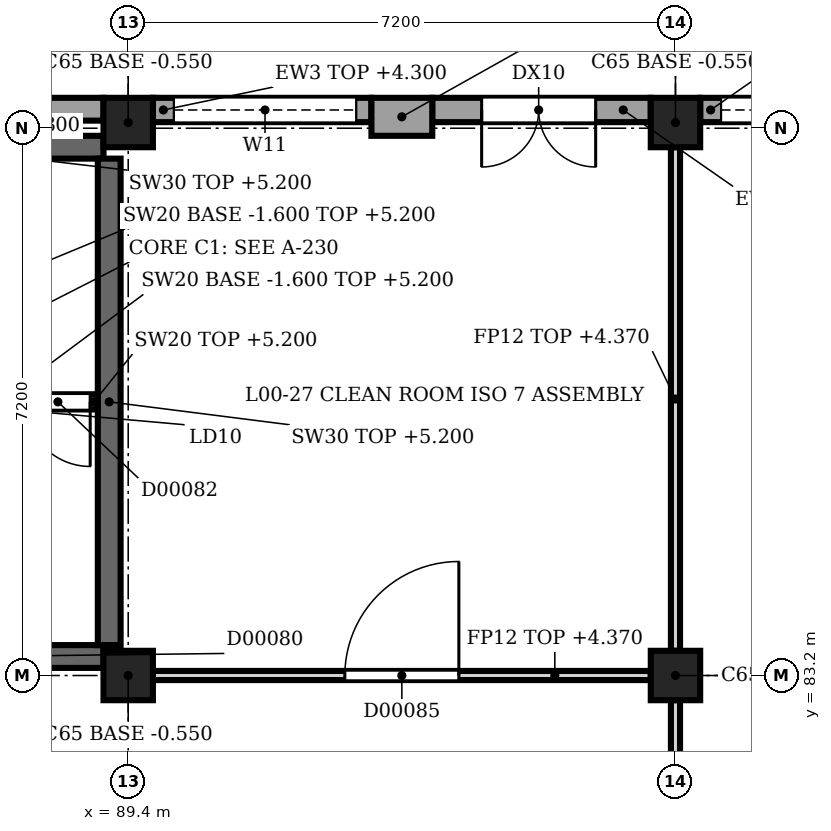
"""IFC4 building model, lengths in metres.
Left out: names, types, materials, properties, quantities, classifications, styles, units other than length and angle.
Written with IfcOpenShell. Run it as: python <this file> out.ifc"""

import sys

from ifc_helpers import new_model, si_unit, direction, frame, frame_2d, origin, origin_2d, place, context, subcontext, project, spatial, rectangle, extrude, element, fill, save


model = new_model("IFC4")
c1 = context("Model", 3, precision=1e-05, world=origin(), true_north=direction((0.0, 1.0)))
c2 = subcontext(c1, "Body", "Model", "MODEL_VIEW")
j1 = project(units=[si_unit("LENGTHUNIT", "METRE"), si_unit("PLANEANGLEUNIT", "RADIAN")], contexts=[c1])
p1 = place(None, origin())
s1 = spatial("IfcSite", under=j1, at=p1, CompositionType="ELEMENT")
p2 = place(p1, origin())
s2 = spatial("IfcBuilding", under=s1, at=p2, CompositionType="ELEMENT")
p3 = place(p2, origin())
s3 = spatial("IfcBuildingStorey", under=s2, at=p3, CompositionType="ELEMENT", Elevation=0.0)
for number, where, z_axis, x_axis in (
    (1, (89.4, 83.2, -0.55), (0.0, 0.0, 1.0), (1.0, 0.0, 0.0)),
    (2, (89.4, 90.475, -0.55), (0.0, 0.0, 1.0), (1.0, 0.0, 0.0)),
    (3, (96.6, 83.2, -0.55), (0.0, 0.0, 1.0), (1.0, 0.0, 0.0)),
    (4, (96.6, 90.475, -0.55), (0.0, 0.0, 1.0), (1.0, 0.0, 0.0)),
):
    element("IfcColumn", number, at=place(p3, frame(where, z_axis=z_axis, x_axis=x_axis)), inside=s3, PredefinedType="COLUMN", context=c2, shape_type="SweptSolid", body=[
        extrude(rectangle(XDim=0.65, YDim=0.65, at=origin_2d()), origin(), (0.0, 0.0, 1.0), 5.95),
    ])
p4 = place(p3, frame((92.6, 90.55, 0.0), z_axis=(0.0, 0.0, 1.0), x_axis=(1.0, 0.0, 0.0)))
e5 = element("IfcWall", 5, at=p4, inside=s3, PredefinedType="SOLIDWALL", context=c2, shape_type="SweptSolid", body=[
    extrude(rectangle(XDim=0.8, YDim=0.5, at=frame_2d((0.4, 0.0))), origin(), (0.0, 0.0, 1.0), 4.3),
])
p5 = place(p3, frame((86.2, 90.65, 0.0), z_axis=(0.0, 0.0, 1.0), x_axis=(1.0, 0.0, 0.0)))
e6 = element("IfcWall", 6, at=p5, inside=s3, PredefinedType="SOLIDWALL", context=c2, shape_type="SweptSolid", body=[
    extrude(rectangle(XDim=2.875, YDim=0.3, at=frame_2d((1.438, 0.0))), origin(), (0.0, 0.0, 1.0), 4.3),
])
p6 = place(p3, frame((89.725, 90.64, 0.0), z_axis=(0.0, 0.0, 1.0), x_axis=(1.0, 0.0, 0.0)))
e7 = element("IfcWall", 7, at=p6, inside=s3, PredefinedType="SOLIDWALL", context=c2, shape_type="SweptSolid", body=[
    extrude(rectangle(XDim=2.875, YDim=0.32, at=frame_2d((1.438, 0.0))), origin(), (0.0, 0.0, 1.0), 4.3),
])
p7 = place(p6, frame((0.275, 0.0, 2.2)))
e8 = element("IfcOpeningElement", 8, at=p7, cuts=e7, PredefinedType="OPENING", context=c2, shape_type="SweptSolid", body=[
    extrude(rectangle(XDim=2.4, YDim=0.9, at=frame_2d((1.2, 0.45))), frame((0.0, 0.17, 0.0), z_axis=(0.0, -1.0, 0.0), x_axis=(1.0, 0.0, 0.0)), (0.0, 0.0, 1.0), 0.34),
])
p8 = place(p3, frame((93.4, 90.64, 0.0), z_axis=(0.0, 0.0, 1.0), x_axis=(1.0, 0.0, 0.0)))
e9 = element("IfcWall", 9, at=p8, inside=s3, PredefinedType="SOLIDWALL", context=c2, shape_type="SweptSolid", body=[
    extrude(rectangle(XDim=2.875, YDim=0.32, at=frame_2d((1.438, 0.0))), origin(), (0.0, 0.0, 1.0), 4.3),
])
p9 = place(p8, frame((0.65, 0.0, 0.0)))
e10 = element("IfcOpeningElement", 10, at=p9, cuts=e9, PredefinedType="OPENING", context=c2, shape_type="SweptSolid", body=[
    extrude(rectangle(XDim=1.5, YDim=2.3, at=frame_2d((0.75, 1.15))), frame((0.0, 0.17, 0.0), z_axis=(0.0, -1.0, 0.0), x_axis=(1.0, 0.0, 0.0)), (0.0, 0.0, 1.0), 0.34),
])
p10 = place(p3, frame((96.925, 90.64, 0.0), z_axis=(0.0, 0.0, 1.0), x_axis=(1.0, 0.0, 0.0)))
e11 = element("IfcWall", 11, at=p10, inside=s3, PredefinedType="SOLIDWALL", context=c2, shape_type="SweptSolid", body=[
    extrude(rectangle(XDim=2.875, YDim=0.32, at=frame_2d((1.438, 0.0))), origin(), (0.0, 0.0, 1.0), 4.3),
])
p11 = place(p10, frame((0.275, 0.0, 2.2)))
e12 = element("IfcOpeningElement", 12, at=p11, cuts=e11, PredefinedType="OPENING", context=c2, shape_type="SweptSolid", body=[
    extrude(rectangle(XDim=2.4, YDim=0.9, at=frame_2d((1.2, 0.45))), frame((0.0, 0.17, 0.0), z_axis=(0.0, -1.0, 0.0), x_axis=(1.0, 0.0, 0.0)), (0.0, 0.0, 1.0), 0.34),
])
p12 = place(p3, frame((82.55, 83.45, 0.0), z_axis=(0.0, 0.0, 1.0), x_axis=(1.0, 0.0, 0.0)))
e13 = element("IfcWall", 13, at=p12, inside=s3, PredefinedType="SHEAR", context=c2, shape_type="SweptSolid", body=[
    extrude(rectangle(XDim=6.525, YDim=0.3, at=frame_2d((3.262, 0.0))), origin(), (0.0, 0.0, 1.0), 5.2),
])
p13 = place(p12, frame((4.25, 0.0, 0.0)))
e14 = element("IfcOpeningElement", 14, at=p13, cuts=e13, PredefinedType="OPENING", context=c2, shape_type="SweptSolid", body=[
    extrude(rectangle(XDim=1.2, YDim=2.1, at=frame_2d((0.6, 1.05))), frame((0.0, 0.16, 0.0), z_axis=(0.0, -1.0, 0.0), x_axis=(1.0, 0.0, 0.0)), (0.0, 0.0, 1.0), 0.32),
])
p14 = place(p3, frame((82.55, 90.15, 0.0), z_axis=(0.0, 0.0, 1.0), x_axis=(1.0, 0.0, 0.0)))
e15 = element("IfcWall", 15, at=p14, inside=s3, PredefinedType="SHEAR", context=c2, shape_type="SweptSolid", body=[
    extrude(rectangle(XDim=6.525, YDim=0.3, at=frame_2d((3.262, 0.0))), origin(), (0.0, 0.0, 1.0), 5.2),
])
p15 = place(p14, frame((0.9, 0.0, 0.0)))
e16 = element("IfcOpeningElement", 16, at=p15, cuts=e15, PredefinedType="OPENING", context=c2, shape_type="SweptSolid", body=[
    extrude(rectangle(XDim=1.1, YDim=2.1, at=frame_2d((0.55, 1.05))), frame((0.0, 0.16, 0.0), z_axis=(0.0, -1.0, 0.0), x_axis=(1.0, 0.0, 0.0)), (0.0, 0.0, 1.0), 0.32),
])
p16 = place(p3, frame((89.15, 83.6, 0.0), z_axis=(0.0, 0.0, 1.0), x_axis=(0.0, 1.0, 0.0)))
e17 = element("IfcWall", 17, at=p16, inside=s3, PredefinedType="SHEAR", context=c2, shape_type="SweptSolid", body=[
    extrude(rectangle(XDim=6.4, YDim=0.3, at=frame_2d((3.2, 0.0))), origin(), (0.0, 0.0, 1.0), 5.2),
])
p17 = place(p3, frame((89.0, 86.8, 0.0), z_axis=(0.0, 0.0, 1.0), x_axis=(-1.0, 0.0, 0.0)))
e18 = element("IfcWall", 18, at=p17, inside=s3, PredefinedType="SHEAR", context=c2, shape_type="SweptSolid", body=[
    extrude(rectangle(XDim=1.05, YDim=0.2, at=frame_2d((0.525, 0.0))), origin(), (0.0, 0.0, 1.0), 5.2),
])
p18 = place(p17, frame((0.1, 0.0, 0.0)))
e19 = element("IfcOpeningElement", 19, at=p18, cuts=e18, PredefinedType="OPENING", context=c2, shape_type="SweptSolid", body=[
    extrude(rectangle(XDim=0.85, YDim=2.1, at=frame_2d((0.425, 1.05))), frame((0.0, 0.11, 0.0), z_axis=(0.0, -1.0, 0.0), x_axis=(1.0, 0.0, 0.0)), (0.0, 0.0, 1.0), 0.22),
])
p19 = place(p3, frame((89.725, 83.2, 0.0), z_axis=(0.0, 0.0, 1.0), x_axis=(1.0, 0.0, 0.0)))
e20 = element("IfcWall", 20, at=p19, inside=s3, PredefinedType="PARTITIONING", context=c2, shape_type="SweptSolid", body=[
    extrude(rectangle(XDim=6.55, YDim=0.12, at=frame_2d((3.275, 0.0))), origin(), (0.0, 0.0, 1.0), 4.37),
])
p20 = place(p19, frame((2.525, 0.0, 0.0)))
e21 = element("IfcOpeningElement", 21, at=p20, cuts=e20, PredefinedType="OPENING", context=c2, shape_type="SweptSolid", body=[
    extrude(rectangle(XDim=1.5, YDim=2.2, at=frame_2d((0.75, 1.1))), frame((0.0, 0.07, 0.0), z_axis=(0.0, -1.0, 0.0), x_axis=(1.0, 0.0, 0.0)), (0.0, 0.0, 1.0), 0.14),
])
p21 = place(p3, frame((96.6, 82.875, 0.0), z_axis=(0.0, 0.0, 1.0), x_axis=(0.0, -1.0, 0.0)))
e22 = element("IfcWall", 22, at=p21, inside=s3, PredefinedType="PARTITIONING", context=c2, shape_type="SweptSolid", body=[
    extrude(rectangle(XDim=6.55, YDim=0.12, at=frame_2d((3.275, 0.0))), origin(), (0.0, 0.0, 1.0), 4.37),
])
p22 = place(p21, frame((2.525, 0.0, 0.0)))
e23 = element("IfcOpeningElement", 23, at=p22, cuts=e22, PredefinedType="OPENING", context=c2, shape_type="SweptSolid", body=[
    extrude(rectangle(XDim=1.5, YDim=2.2, at=frame_2d((0.75, 1.1))), frame((0.0, 0.07, 0.0), z_axis=(0.0, -1.0, 0.0), x_axis=(1.0, 0.0, 0.0)), (0.0, 0.0, 1.0), 0.14),
])
p23 = place(p3, frame((96.6, 83.525, 0.0), z_axis=(0.0, 0.0, 1.0), x_axis=(0.0, 1.0, 0.0)))
e24 = element("IfcWall", 24, at=p23, inside=s3, PredefinedType="PARTITIONING", context=c2, shape_type="SweptSolid", body=[
    extrude(rectangle(XDim=6.625, YDim=0.12, at=frame_2d((3.312, 0.0))), origin(), (0.0, 0.0, 1.0), 4.37),
])
p24 = place(p7, origin())
e25 = element("IfcWindow", 25, at=p24, inside=s3, PartitioningType="SINGLE_PANEL", PredefinedType="WINDOW", context=c2, shape_type="SweptSolid", body=[
    extrude(rectangle(XDim=2.4, YDim=0.9, at=frame_2d((1.2, 0.45))), frame((0.0, 0.03, 0.0), z_axis=(0.0, -1.0, 0.0), x_axis=(1.0, 0.0, 0.0)), (0.0, 0.0, 1.0), 0.06),
])
fill(e8, e25)
p25 = place(p9, origin())
e26 = element("IfcDoor", 26, at=p25, inside=s3, OperationType="SINGLE_SWING_LEFT", PredefinedType="DOOR", context=c2, shape_type="SweptSolid", body=[
    extrude(rectangle(XDim=1.5, YDim=2.3, at=frame_2d((0.75, 1.15))), frame((0.0, 0.025, 0.0), z_axis=(0.0, -1.0, 0.0), x_axis=(1.0, 0.0, 0.0)), (0.0, 0.0, 1.0), 0.05),
])
fill(e10, e26)
p26 = place(p11, origin())
e27 = element("IfcWindow", 27, at=p26, inside=s3, PartitioningType="SINGLE_PANEL", PredefinedType="WINDOW", context=c2, shape_type="SweptSolid", body=[
    extrude(rectangle(XDim=2.4, YDim=0.9, at=frame_2d((1.2, 0.45))), frame((0.0, 0.03, 0.0), z_axis=(0.0, -1.0, 0.0), x_axis=(1.0, 0.0, 0.0)), (0.0, 0.0, 1.0), 0.06),
])
fill(e12, e27)
p27 = place(p18, origin())
e28 = element("IfcDoor", 28, at=p27, inside=s3, OperationType="SINGLE_SWING_RIGHT", PredefinedType="DOOR", context=c2, shape_type="SweptSolid", body=[
    extrude(rectangle(XDim=0.85, YDim=2.1, at=frame_2d((0.425, 1.05))), frame((0.0, 0.025, 0.0), z_axis=(0.0, -1.0, 0.0), x_axis=(1.0, 0.0, 0.0)), (0.0, 0.0, 1.0), 0.05),
])
fill(e19, e28)
p28 = place(p20, origin())
e29 = element("IfcDoor", 29, at=p28, inside=s3, OperationType="SINGLE_SWING_LEFT", PredefinedType="DOOR", context=c2, shape_type="SweptSolid", body=[
    extrude(rectangle(XDim=1.5, YDim=2.2, at=frame_2d((0.75, 1.1))), frame((0.0, 0.025, 0.0), z_axis=(0.0, -1.0, 0.0), x_axis=(1.0, 0.0, 0.0)), (0.0, 0.0, 1.0), 0.05),
])
fill(e21, e29)
save(model, sys.argv[1])
